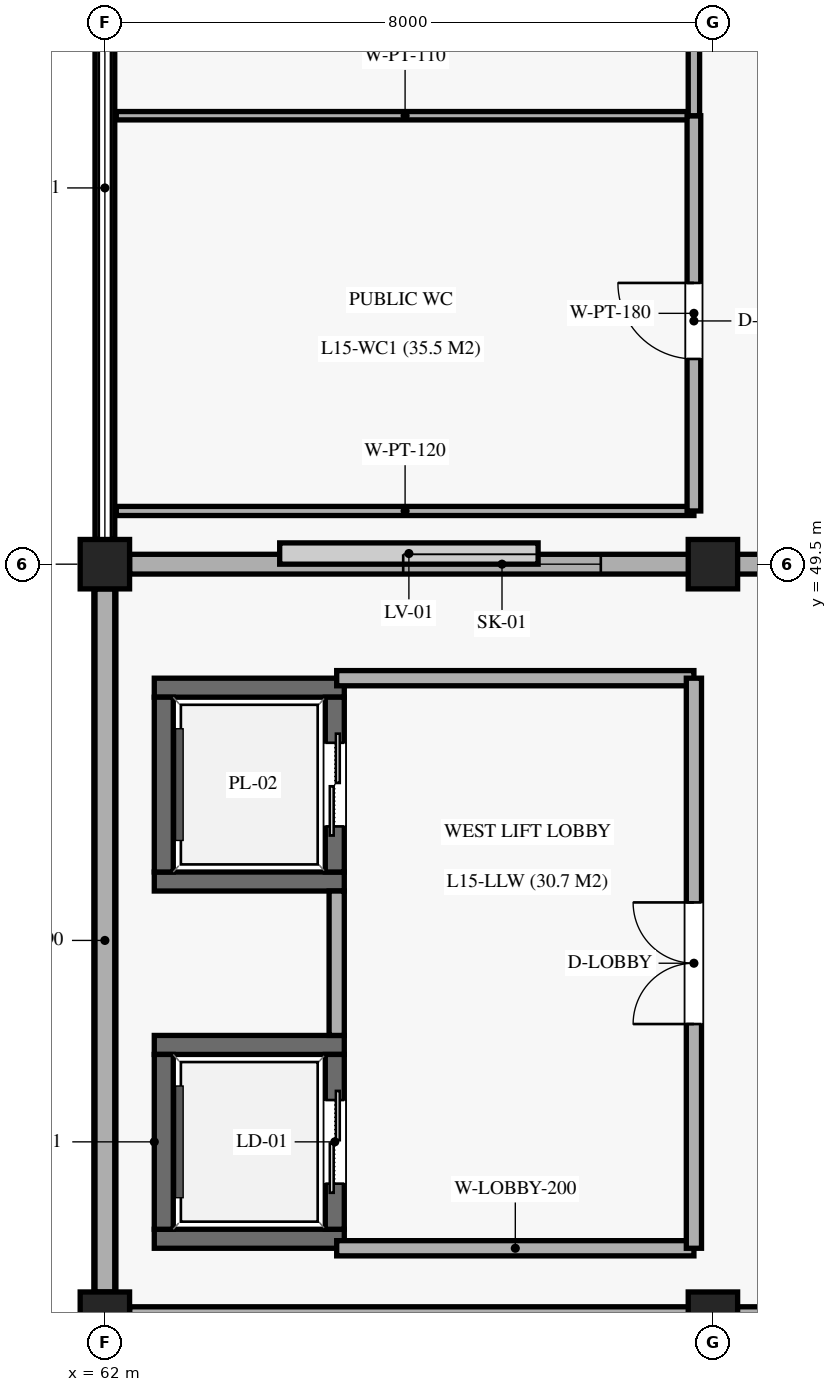
"""IFC4 building model, lengths in metres.
Left out: names, types, materials, properties, quantities, classifications, styles, units other than length and angle.
Written with IfcOpenShell. Run it as: python <this file> out.ifc"""

import sys

from ifc_helpers import new_model, si_unit, direction, frame, frame_2d, origin, origin_2d, place, context, subcontext, project, spatial, polyline, rectangle, outline, extrude, element, fill, save


model = new_model("IFC4")
c1 = context("Model", 3, precision=1e-05, world=origin(), true_north=direction((0.0, 1.0)))
c2 = subcontext(c1, "Body", "Model", "MODEL_VIEW")
j1 = project(units=[si_unit("LENGTHUNIT", "METRE"), si_unit("PLANEANGLEUNIT", "RADIAN")], contexts=[c1])
p1 = place(None, origin())
s1 = spatial("IfcSite", under=j1, at=p1, CompositionType="ELEMENT")
p2 = place(p1, origin())
s2 = spatial("IfcBuilding", under=s1, at=p2, CompositionType="ELEMENT")
p3 = place(p2, frame((0.0, 0.0, 74.46)))
s3 = spatial("IfcBuildingStorey", under=s2, at=p3, CompositionType="ELEMENT", Elevation=74.46)
p4 = place(p3, frame((62.0, 39.6, 0.0), z_axis=(0.0, 0.0, 1.0), x_axis=(1.0, 0.0, 0.0)))
e1 = element("IfcColumn", 1, at=p4, inside=s3, PredefinedType="COLUMN", context=c2, shape_type="SweptSolid", body=[
    extrude(rectangle(XDim=0.65, YDim=0.65, at=origin_2d()), origin(), (0.0, 0.0, 1.0), 5.66),
])
p5 = place(p3, frame((62.0, 49.5, 0.0), z_axis=(0.0, 0.0, 1.0), x_axis=(1.0, 0.0, 0.0)))
e2 = element("IfcColumn", 2, at=p5, inside=s3, PredefinedType="COLUMN", context=c2, shape_type="SweptSolid", body=[
    extrude(rectangle(XDim=0.65, YDim=0.65, at=origin_2d()), origin(), (0.0, 0.0, 1.0), 7.49),
])
p6 = place(p3, frame((70.0, 39.6, 0.0), z_axis=(0.0, 0.0, 1.0), x_axis=(1.0, 0.0, 0.0)))
e3 = element("IfcColumn", 3, at=p6, inside=s3, PredefinedType="COLUMN", context=c2, shape_type="SweptSolid", body=[
    extrude(rectangle(XDim=0.65, YDim=0.65, at=origin_2d()), origin(), (0.0, 0.0, 1.0), 5.66),
])
p7 = place(p3, frame((70.0, 49.5, 0.0), z_axis=(0.0, 0.0, 1.0), x_axis=(1.0, 0.0, 0.0)))
e4 = element("IfcColumn", 4, at=p7, inside=s3, PredefinedType="COLUMN", context=c2, shape_type="SweptSolid", body=[
    extrude(rectangle(XDim=0.65, YDim=0.65, at=origin_2d()), origin(), (0.0, 0.0, 1.0), 7.49),
])
p8 = place(p3, frame((62.0, 39.925, 0.0), z_axis=(0.0, 0.0, 1.0), x_axis=(0.0, 1.0, 0.0)))
e5 = element("IfcWall", 5, at=p8, inside=s3, PredefinedType="SOLIDWALL", context=c2, shape_type="SweptSolid", body=[
    extrude(rectangle(XDim=9.25, YDim=0.29, at=frame_2d((4.625, 0.0))), origin(), (0.0, 0.0, 1.0), 3.29),
])
p9 = place(p3, frame((62.325, 39.6, 4.04), z_axis=(0.0, 0.0, 1.0), x_axis=(1.0, 0.0, 0.0)))
e6 = element("IfcWall", 6, at=p9, inside=s3, PredefinedType="SOLIDWALL", context=c2, shape_type="SweptSolid", body=[
    extrude(rectangle(XDim=29.35, YDim=0.26, at=frame_2d((14.675, 0.0))), origin(), (0.0, 0.0, 1.0), 1.135),
])
p10 = place(p3, frame((62.325, 49.5, 4.04), z_axis=(0.0, 0.0, 1.0), x_axis=(1.0, 0.0, 0.0)))
e7 = element("IfcWall", 7, at=p10, inside=s3, PredefinedType="SOLIDWALL", context=c2, shape_type="SweptSolid", body=[
    extrude(rectangle(XDim=29.35, YDim=0.26, at=frame_2d((14.675, 0.0))), origin(), (0.0, 0.0, 1.0), 2.956),
])
p11 = place(p10, frame((3.6, 0.0, 1.15)))
e8 = element("IfcOpeningElement", 8, at=p11, cuts=e7, PredefinedType="OPENING", context=c2, shape_type="SweptSolid", body=[
    extrude(rectangle(XDim=2.6, YDim=1.45, at=frame_2d((1.3, 0.725))), frame((0.0, 0.14, 0.0), z_axis=(0.0, -1.0, 0.0), x_axis=(1.0, 0.0, 0.0)), (0.0, 0.0, 1.0), 0.28),
])
p12 = place(p10, frame((10.6, 0.0, 1.15)))
e9 = element("IfcOpeningElement", 9, at=p12, cuts=e7, PredefinedType="OPENING", context=c2, shape_type="SweptSolid", body=[
    extrude(rectangle(XDim=2.4, YDim=1.45, at=frame_2d((1.2, 0.725))), frame((0.0, 0.14, 0.0), z_axis=(0.0, -1.0, 0.0), x_axis=(1.0, 0.0, 0.0)), (0.0, 0.0, 1.0), 0.28),
])
p13 = place(p10, frame((16.6, 0.0, 1.15)))
e10 = element("IfcOpeningElement", 10, at=p13, cuts=e7, PredefinedType="OPENING", context=c2, shape_type="SweptSolid", body=[
    extrude(rectangle(XDim=2.2, YDim=1.45, at=frame_2d((1.1, 0.725))), frame((0.0, 0.14, 0.0), z_axis=(0.0, -1.0, 0.0), x_axis=(1.0, 0.0, 0.0)), (0.0, 0.0, 1.0), 0.28),
])
p14 = place(p10, frame((22.6, 0.0, 1.15)))
e11 = element("IfcOpeningElement", 11, at=p14, cuts=e7, PredefinedType="OPENING", context=c2, shape_type="SweptSolid", body=[
    extrude(rectangle(XDim=2.0, YDim=1.45, at=frame_2d((1.0, 0.725))), frame((0.0, 0.14, 0.0), z_axis=(0.0, -1.0, 0.0), x_axis=(1.0, 0.0, 0.0)), (0.0, 0.0, 1.0), 0.28),
])
for number, where, z_axis, x_axis in (
    (12, (62.0, 39.925, 4.04), (0.0, 0.0, 1.0), (0.0, 1.0, 0.0)),
    (13, (62.0, 49.825, 4.04), (0.0, 0.0, 1.0), (0.0, 1.0, 0.0)),
):
    element("IfcWall", number, at=place(p3, frame(where, z_axis=z_axis, x_axis=x_axis)), inside=s3, PredefinedType="SOLIDWALL", context=c2, shape_type="SweptSolid", body=[
        extrude(outline(polyline([(0.0, 0.0), (9.25, 0.0), (9.25, 3.62), (0.0, 0.1), (0.0, 0.0)])), frame((0.0, 0.13, 0.0), z_axis=(0.0, -1.0, 0.0), x_axis=(1.0, 0.0, 0.0)), (0.0, 0.0, 1.0), 0.26),
    ])
for number, where, z_axis, x_axis in (
    (14, (62.65, 40.625, 0.0), (0.0, 0.0, 1.0), (1.0, 0.0, 0.0)),
    (15, (62.65, 43.175, 0.0), (0.0, 0.0, 1.0), (1.0, 0.0, 0.0)),
):
    element("IfcWall", number, at=place(p3, frame(where, z_axis=z_axis, x_axis=x_axis)), inside=s3, PredefinedType="SOLIDWALL", context=c2, shape_type="SweptSolid", body=[
        extrude(rectangle(XDim=2.5, YDim=0.25, at=frame_2d((1.25, 0.0))), origin(), (0.0, 0.0, 1.0), 4.02),
    ])
p15 = place(p3, frame((62.775, 40.75, 0.0), z_axis=(0.0, 0.0, 1.0), x_axis=(0.0, 1.0, 0.0)))
e16 = element("IfcWall", 16, at=p15, inside=s3, PredefinedType="SOLIDWALL", context=c2, shape_type="SweptSolid", body=[
    extrude(rectangle(XDim=2.3, YDim=0.25, at=frame_2d((1.15, 0.0))), origin(), (0.0, 0.0, 1.0), 4.02),
])
p16 = place(p3, frame((65.025, 40.75, 0.0), z_axis=(0.0, 0.0, 1.0), x_axis=(0.0, 1.0, 0.0)))
e17 = element("IfcWall", 17, at=p16, inside=s3, PredefinedType="SOLIDWALL", context=c2, shape_type="SweptSolid", body=[
    extrude(rectangle(XDim=2.3, YDim=0.25, at=frame_2d((1.15, 0.0))), origin(), (0.0, 0.0, 1.0), 4.02),
])
p17 = place(p16, frame((0.6, 0.0, 0.0)))
e18 = element("IfcOpeningElement", 18, at=p17, cuts=e17, PredefinedType="OPENING", context=c2, shape_type="SweptSolid", body=[
    extrude(rectangle(XDim=1.1, YDim=2.2, at=frame_2d((0.55, 1.1))), frame((0.0, 0.135, 0.0), z_axis=(0.0, -1.0, 0.0), x_axis=(1.0, 0.0, 0.0)), (0.0, 0.0, 1.0), 0.27),
])
for number, where, z_axis, x_axis in (
    (19, (62.65, 45.325, 0.0), (0.0, 0.0, 1.0), (1.0, 0.0, 0.0)),
    (20, (62.65, 47.875, 0.0), (0.0, 0.0, 1.0), (1.0, 0.0, 0.0)),
):
    element("IfcWall", number, at=place(p3, frame(where, z_axis=z_axis, x_axis=x_axis)), inside=s3, PredefinedType="SOLIDWALL", context=c2, shape_type="SweptSolid", body=[
        extrude(rectangle(XDim=2.5, YDim=0.25, at=frame_2d((1.25, 0.0))), origin(), (0.0, 0.0, 1.0), 4.02),
    ])
p18 = place(p3, frame((62.775, 45.45, 0.0), z_axis=(0.0, 0.0, 1.0), x_axis=(0.0, 1.0, 0.0)))
e21 = element("IfcWall", 21, at=p18, inside=s3, PredefinedType="SOLIDWALL", context=c2, shape_type="SweptSolid", body=[
    extrude(rectangle(XDim=2.3, YDim=0.25, at=frame_2d((1.15, 0.0))), origin(), (0.0, 0.0, 1.0), 4.02),
])
p19 = place(p3, frame((65.025, 45.45, 0.0), z_axis=(0.0, 0.0, 1.0), x_axis=(0.0, 1.0, 0.0)))
e22 = element("IfcWall", 22, at=p19, inside=s3, PredefinedType="SOLIDWALL", context=c2, shape_type="SweptSolid", body=[
    extrude(rectangle(XDim=2.3, YDim=0.25, at=frame_2d((1.15, 0.0))), origin(), (0.0, 0.0, 1.0), 4.02),
])
p20 = place(p19, frame((0.6, 0.0, 0.0)))
e23 = element("IfcOpeningElement", 23, at=p20, cuts=e22, PredefinedType="OPENING", context=c2, shape_type="SweptSolid", body=[
    extrude(rectangle(XDim=1.1, YDim=2.2, at=frame_2d((0.55, 1.1))), frame((0.0, 0.135, 0.0), z_axis=(0.0, -1.0, 0.0), x_axis=(1.0, 0.0, 0.0)), (0.0, 0.0, 1.0), 0.27),
])
for number, where, z_axis, x_axis in (
    (24, (65.05, 40.5, 0.0), (0.0, 0.0, 1.0), (1.0, 0.0, 0.0)),
    (25, (65.05, 48.0, 0.0), (0.0, 0.0, 1.0), (1.0, 0.0, 0.0)),
):
    element("IfcWall", number, at=place(p3, frame(where, z_axis=z_axis, x_axis=x_axis)), inside=s3, PredefinedType="SOLIDWALL", context=c2, shape_type="SweptSolid", body=[
        extrude(rectangle(XDim=4.7, YDim=0.2, at=frame_2d((2.35, 0.0))), origin(), (0.0, 0.0, 1.0), 3.16),
    ])
p21 = place(p3, frame((65.05, 43.3, 0.0), z_axis=(0.0, 0.0, 1.0), x_axis=(0.0, 1.0, 0.0)))
e26 = element("IfcWall", 26, at=p21, inside=s3, PredefinedType="SOLIDWALL", context=c2, shape_type="SweptSolid", body=[
    extrude(rectangle(XDim=1.9, YDim=0.2, at=frame_2d((0.95, 0.0))), origin(), (0.0, 0.0, 1.0), 3.16),
])
p22 = place(p3, frame((69.75, 40.5, 0.0), z_axis=(0.0, 0.0, 1.0), x_axis=(0.0, 1.0, 0.0)))
e27 = element("IfcWall", 27, at=p22, inside=s3, PredefinedType="SOLIDWALL", context=c2, shape_type="SweptSolid", body=[
    extrude(rectangle(XDim=7.5, YDim=0.2, at=frame_2d((3.75, 0.0))), origin(), (0.0, 0.0, 1.0), 3.16),
])
p23 = place(p22, frame((2.95, 0.0, 0.0)))
e28 = element("IfcOpeningElement", 28, at=p23, cuts=e27, PredefinedType="OPENING", context=c2, shape_type="SweptSolid", body=[
    extrude(rectangle(XDim=1.6, YDim=2.2, at=frame_2d((0.8, 1.1))), frame((0.0, 0.11, 0.0), z_axis=(0.0, -1.0, 0.0), x_axis=(1.0, 0.0, 0.0)), (0.0, 0.0, 1.0), 0.22),
])
p24 = place(p3, frame((62.15, 50.2, 0.0), z_axis=(0.0, 0.0, 1.0), x_axis=(1.0, 0.0, 0.0)))
e29 = element("IfcWall", 29, at=p24, inside=s3, PredefinedType="PARTITIONING", context=c2, shape_type="SweptSolid", body=[
    extrude(rectangle(XDim=7.6, YDim=0.12, at=frame_2d((3.8, 0.0))), origin(), (0.0, 0.0, 1.0), 3.16),
])
p25 = place(p3, frame((62.15, 55.4, 0.0), z_axis=(0.0, 0.0, 1.0), x_axis=(1.0, 0.0, 0.0)))
e30 = element("IfcWall", 30, at=p25, inside=s3, PredefinedType="PARTITIONING", context=c2, shape_type="SweptSolid", body=[
    extrude(rectangle(XDim=7.6, YDim=0.11, at=frame_2d((3.8, 0.0))), origin(), (0.0, 0.0, 1.0), 3.16),
])
p26 = place(p3, frame((69.75, 50.2, 0.0), z_axis=(0.0, 0.0, 1.0), x_axis=(0.0, 1.0, 0.0)))
e31 = element("IfcWall", 31, at=p26, inside=s3, PredefinedType="PARTITIONING", context=c2, shape_type="SweptSolid", body=[
    extrude(rectangle(XDim=5.2, YDim=0.18, at=frame_2d((2.6, 0.0))), origin(), (0.0, 0.0, 1.0), 3.16),
])
p27 = place(p26, frame((2.0, 0.0, 0.0)))
e32 = element("IfcOpeningElement", 32, at=p27, cuts=e31, PredefinedType="OPENING", context=c2, shape_type="SweptSolid", body=[
    extrude(rectangle(XDim=1.0, YDim=2.1, at=frame_2d((0.5, 1.05))), frame((0.0, 0.1, 0.0), z_axis=(0.0, -1.0, 0.0), x_axis=(1.0, 0.0, 0.0)), (0.0, 0.0, 1.0), 0.2),
])
p28 = place(p3, frame((69.75, 55.4, 0.0), z_axis=(0.0, 0.0, 1.0), x_axis=(0.0, 1.0, 0.0)))
e33 = element("IfcWall", 33, at=p28, inside=s3, PredefinedType="PARTITIONING", context=c2, shape_type="SweptSolid", body=[
    extrude(rectangle(XDim=3.5, YDim=0.15, at=frame_2d((1.75, 0.0))), origin(), (0.0, 0.0, 1.0), 3.16),
])
p29 = place(p28, frame((1.15, 0.0, 0.0)))
e34 = element("IfcOpeningElement", 34, at=p29, cuts=e33, PredefinedType="OPENING", context=c2, shape_type="SweptSolid", body=[
    extrude(rectangle(XDim=1.05, YDim=2.15, at=frame_2d((0.525, 1.075))), frame((0.0, 0.085, 0.0), z_axis=(0.0, -1.0, 0.0), x_axis=(1.0, 0.0, 0.0)), (0.0, 0.0, 1.0), 0.17),
])
p30 = place(p11, origin())
e35 = element("IfcWindow", 35, at=p30, inside=s3, PartitioningType="SINGLE_PANEL", PredefinedType="SKYLIGHT", context=c2, shape_type="SweptSolid", body=[
    extrude(rectangle(XDim=2.6, YDim=1.45, at=frame_2d((1.3, 0.725))), frame((0.0, 0.03, 0.0), z_axis=(0.0, -1.0, 0.0), x_axis=(1.0, 0.0, 0.0)), (0.0, 0.0, 1.0), 0.06),
])
fill(e8, e35)
p31 = place(p17, origin())
e36 = element("IfcDoor", 36, at=p31, inside=s3, OperationType="DOUBLE_DOOR_SLIDING", PredefinedType="DOOR", context=c2, shape_type="SweptSolid", body=[
    extrude(rectangle(XDim=1.1, YDim=2.2, at=frame_2d((0.55, 1.1))), frame((0.0, 0.025, 0.0), z_axis=(0.0, -1.0, 0.0), x_axis=(1.0, 0.0, 0.0)), (0.0, 0.0, 1.0), 0.05),
])
fill(e18, e36)
p32 = place(p20, origin())
e37 = element("IfcDoor", 37, at=p32, inside=s3, OperationType="DOUBLE_DOOR_SLIDING", PredefinedType="DOOR", context=c2, shape_type="SweptSolid", body=[
    extrude(rectangle(XDim=1.1, YDim=2.2, at=frame_2d((0.55, 1.1))), frame((0.0, 0.025, 0.0), z_axis=(0.0, -1.0, 0.0), x_axis=(1.0, 0.0, 0.0)), (0.0, 0.0, 1.0), 0.05),
])
fill(e23, e37)
p33 = place(p23, origin())
e38 = element("IfcDoor", 38, at=p33, inside=s3, OperationType="DOUBLE_DOOR_SINGLE_SWING", PredefinedType="DOOR", context=c2, shape_type="SweptSolid", body=[
    extrude(rectangle(XDim=1.6, YDim=2.2, at=frame_2d((0.8, 1.1))), frame((0.0, 0.025, 0.0), z_axis=(0.0, -1.0, 0.0), x_axis=(1.0, 0.0, 0.0)), (0.0, 0.0, 1.0), 0.05),
])
fill(e28, e38)
p34 = place(p27, origin())
e39 = element("IfcDoor", 39, at=p34, inside=s3, OperationType="SINGLE_SWING_RIGHT", PredefinedType="DOOR", context=c2, shape_type="SweptSolid", body=[
    extrude(rectangle(XDim=1.0, YDim=2.1, at=frame_2d((0.5, 1.05))), frame((0.0, 0.025, 0.0), z_axis=(0.0, -1.0, 0.0), x_axis=(1.0, 0.0, 0.0)), (0.0, 0.0, 1.0), 0.05),
])
fill(e32, e39)
save(model, sys.argv[1])
